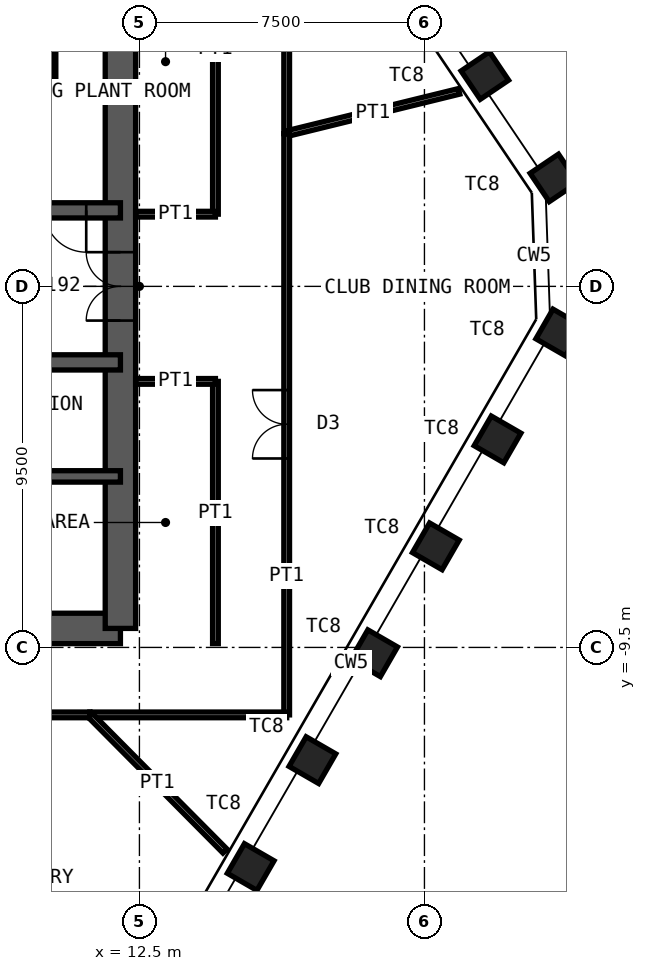
"""IFC4 building model, lengths in metres.
Left out: names, types, materials, properties, quantities, classifications, styles, units other than length and angle.
Written with IfcOpenShell. Run it as: python <this file> out.ifc"""

import sys

from ifc_helpers import new_model, si_unit, direction, frame, frame_2d, origin, origin_2d, place, context, subcontext, project, spatial, rectangle, hollow_rectangle, extrude, element, fill, save


model = new_model("IFC4")
c1 = context("Model", 3, precision=1e-05, world=origin(), true_north=direction((0.0, 1.0)))
c2 = subcontext(c1, "Body", "Model", "MODEL_VIEW")
j1 = project(units=[si_unit("LENGTHUNIT", "METRE"), si_unit("PLANEANGLEUNIT", "RADIAN")], contexts=[c1])
p1 = place(None, origin())
s1 = spatial("IfcSite", under=j1, at=p1, CompositionType="ELEMENT")
p2 = place(p1, origin())
s2 = spatial("IfcBuilding", under=s1, at=p2, CompositionType="ELEMENT")
p3 = place(p2, frame((0.0, 0.0, 320.8)))
s3 = spatial("IfcBuildingStorey", under=s2, at=p3, CompositionType="ELEMENT", Elevation=320.8)
for number, where, z_axis, x_axis in (
    (1, (21.589, 5.547, 0.0), (0.0, 0.0, 1.0), (-0.559, 0.829, 0.0)),
    (2, (23.406, 2.854, 0.0), (0.0, 0.0, 1.0), (-0.559, 0.829, 0.0)),
    (3, (23.548, -1.214, 0.0), (0.0, 0.0, 1.0), (0.5, 0.866, 0.0)),
    (4, (21.924, -4.027, 0.0), (0.0, 0.0, 1.0), (0.5, 0.866, 0.0)),
    (5, (20.3, -6.84, 0.0), (0.0, 0.0, 1.0), (0.5, 0.866, 0.0)),
    (6, (18.676, -9.653, 0.0), (0.0, 0.0, 1.0), (0.5, 0.866, 0.0)),
    (7, (17.052, -12.466, 0.0), (0.0, 0.0, 1.0), (0.5, 0.866, 0.0)),
    (8, (15.427, -15.279, 0.0), (0.0, 0.0, 1.0), (0.5, 0.866, 0.0)),
):
    element("IfcColumn", number, at=place(p3, frame(where, z_axis=z_axis, x_axis=x_axis)), inside=s3, PredefinedType="COLUMN", context=c2, shape_type="SweptSolid", body=[
        extrude(hollow_rectangle(XDim=0.9, YDim=0.9, WallThickness=0.05, at=origin_2d()), origin(), (0.0, 0.0, 1.0), 4.2),
    ])
p4 = place(p3, frame((-12.0, -9.0, 0.0), z_axis=(0.0, 0.0, 1.0), x_axis=(1.0, 0.0, 0.0)))
e9 = element("IfcWall", 9, at=p4, inside=s3, PredefinedType="SHEAR", context=c2, shape_type="SweptSolid", body=[
    extrude(rectangle(XDim=24.0, YDim=0.8, at=frame_2d((12.0, 0.0))), origin(), (0.0, 0.0, 1.0), 4.2),
])
p5 = place(p4, frame((1.35, 0.0, 0.0)))
e10 = element("IfcOpeningElement", 10, at=p5, cuts=e9, PredefinedType="OPENING", context=c2, shape_type="SweptSolid", body=[
    extrude(rectangle(XDim=1.0, YDim=2.1, at=frame_2d((0.5, 1.05))), frame((0.0, 0.41, 0.0), z_axis=(0.0, -1.0, 0.0), x_axis=(1.0, 0.0, 0.0)), (0.0, 0.0, 1.0), 0.82),
])
p6 = place(p4, frame((5.325, 0.0, 0.0)))
e11 = element("IfcOpeningElement", 11, at=p6, cuts=e9, PredefinedType="OPENING", context=c2, shape_type="SweptSolid", body=[
    extrude(rectangle(XDim=1.15, YDim=2.1, at=frame_2d((0.575, 1.05))), frame((0.0, 0.41, 0.0), z_axis=(0.0, -1.0, 0.0), x_axis=(1.0, 0.0, 0.0)), (0.0, 0.0, 1.0), 0.82),
])
p7 = place(p4, frame((12.6, 0.0, 0.0)))
e12 = element("IfcOpeningElement", 12, at=p7, cuts=e9, PredefinedType="OPENING", context=c2, shape_type="SweptSolid", body=[
    extrude(rectangle(XDim=1.0, YDim=2.1, at=frame_2d((0.5, 1.05))), frame((0.0, 0.41, 0.0), z_axis=(0.0, -1.0, 0.0), x_axis=(1.0, 0.0, 0.0)), (0.0, 0.0, 1.0), 0.82),
])
p8 = place(p3, frame((12.0, -9.0, 0.0), z_axis=(0.0, 0.0, 1.0), x_axis=(0.0, 1.0, 0.0)))
e13 = element("IfcWall", 13, at=p8, inside=s3, PredefinedType="SHEAR", context=c2, shape_type="SweptSolid", body=[
    extrude(rectangle(XDim=18.0, YDim=0.8, at=frame_2d((9.0, 0.0))), origin(), (0.0, 0.0, 1.0), 4.2),
])
p9 = place(p8, frame((8.1, 0.0, 0.0)))
e14 = element("IfcOpeningElement", 14, at=p9, cuts=e13, PredefinedType="OPENING", context=c2, shape_type="SweptSolid", body=[
    extrude(rectangle(XDim=1.8, YDim=2.1, at=frame_2d((0.9, 1.05))), frame((0.0, 0.41, 0.0), z_axis=(0.0, -1.0, 0.0), x_axis=(1.0, 0.0, 0.0)), (0.0, 0.0, 1.0), 0.82),
])
p10 = place(p3, frame((-12.0, 5.0, 0.0), z_axis=(0.0, 0.0, 1.0), x_axis=(1.0, 0.0, 0.0)))
e15 = element("IfcWall", 15, at=p10, inside=s3, PredefinedType="SHEAR", context=c2, shape_type="SweptSolid", body=[
    extrude(rectangle(XDim=24.0, YDim=0.3, at=frame_2d((12.0, 0.0))), origin(), (0.0, 0.0, 1.0), 4.2),
])
p11 = place(p3, frame((-12.0, 2.0, 0.0), z_axis=(0.0, 0.0, 1.0), x_axis=(1.0, 0.0, 0.0)))
e16 = element("IfcWall", 16, at=p11, inside=s3, PredefinedType="SHEAR", context=c2, shape_type="SweptSolid", body=[
    extrude(rectangle(XDim=24.0, YDim=0.4, at=frame_2d((12.0, 0.0))), origin(), (0.0, 0.0, 1.0), 4.2),
])
p12 = place(p11, frame((2.4, 0.0, 0.0)))
e17 = element("IfcOpeningElement", 17, at=p12, cuts=e16, PredefinedType="OPENING", context=c2, shape_type="SweptSolid", body=[
    extrude(rectangle(XDim=1.1, YDim=2.1, at=frame_2d((0.55, 1.05))), frame((0.0, 0.21, 0.0), z_axis=(0.0, -1.0, 0.0), x_axis=(1.0, 0.0, 0.0)), (0.0, 0.0, 1.0), 0.42),
])
p13 = place(p11, frame((22.0, 0.0, 0.0)))
e18 = element("IfcOpeningElement", 18, at=p13, cuts=e16, PredefinedType="OPENING", context=c2, shape_type="SweptSolid", body=[
    extrude(rectangle(XDim=1.1, YDim=2.1, at=frame_2d((0.55, 1.05))), frame((0.0, 0.21, 0.0), z_axis=(0.0, -1.0, 0.0), x_axis=(1.0, 0.0, 0.0)), (0.0, 0.0, 1.0), 0.42),
])
p14 = place(p11, frame((10.15, 0.0, 0.0)))
e19 = element("IfcOpeningElement", 19, at=p14, cuts=e16, PredefinedType="OPENING", context=c2, shape_type="SweptSolid", body=[
    extrude(rectangle(XDim=1.0, YDim=2.1, at=frame_2d((0.5, 1.05))), frame((0.0, 0.21, 0.0), z_axis=(0.0, -1.0, 0.0), x_axis=(1.0, 0.0, 0.0)), (0.0, 0.0, 1.0), 0.42),
])
p15 = place(p11, frame((6.9, 0.0, 0.0)))
e20 = element("IfcOpeningElement", 20, at=p15, cuts=e16, PredefinedType="OPENING", context=c2, shape_type="SweptSolid", body=[
    extrude(rectangle(XDim=1.0, YDim=2.1, at=frame_2d((0.5, 1.05))), frame((0.0, 0.21, 0.0), z_axis=(0.0, -1.0, 0.0), x_axis=(1.0, 0.0, 0.0)), (0.0, 0.0, 1.0), 0.42),
])
p16 = place(p11, frame((13.35, 0.0, 0.0)))
e21 = element("IfcOpeningElement", 21, at=p16, cuts=e16, PredefinedType="OPENING", context=c2, shape_type="SweptSolid", body=[
    extrude(rectangle(XDim=1.1, YDim=2.4, at=frame_2d((0.55, 1.2))), frame((0.0, 0.21, 0.0), z_axis=(0.0, -1.0, 0.0), x_axis=(1.0, 0.0, 0.0)), (0.0, 0.0, 1.0), 0.42),
])
p17 = place(p11, frame((16.15, 0.0, 0.0)))
e22 = element("IfcOpeningElement", 22, at=p17, cuts=e16, PredefinedType="OPENING", context=c2, shape_type="SweptSolid", body=[
    extrude(rectangle(XDim=1.1, YDim=2.4, at=frame_2d((0.55, 1.2))), frame((0.0, 0.21, 0.0), z_axis=(0.0, -1.0, 0.0), x_axis=(1.0, 0.0, 0.0)), (0.0, 0.0, 1.0), 0.42),
])
p18 = place(p11, frame((19.0, 0.0, 0.0)))
e23 = element("IfcOpeningElement", 23, at=p18, cuts=e16, PredefinedType="OPENING", context=c2, shape_type="SweptSolid", body=[
    extrude(rectangle(XDim=1.0, YDim=2.1, at=frame_2d((0.5, 1.05))), frame((0.0, 0.21, 0.0), z_axis=(0.0, -1.0, 0.0), x_axis=(1.0, 0.0, 0.0)), (0.0, 0.0, 1.0), 0.42),
])
p19 = place(p3, frame((-12.0, -2.0, 0.0), z_axis=(0.0, 0.0, 1.0), x_axis=(1.0, 0.0, 0.0)))
e24 = element("IfcWall", 24, at=p19, inside=s3, PredefinedType="SHEAR", context=c2, shape_type="SweptSolid", body=[
    extrude(rectangle(XDim=24.0, YDim=0.4, at=frame_2d((12.0, 0.0))), origin(), (0.0, 0.0, 1.0), 4.2),
])
p20 = place(p19, frame((1.1, 0.0, 0.0)))
e25 = element("IfcOpeningElement", 25, at=p20, cuts=e24, PredefinedType="OPENING", context=c2, shape_type="SweptSolid", body=[
    extrude(rectangle(XDim=1.1, YDim=2.1, at=frame_2d((0.55, 1.05))), frame((0.0, 0.21, 0.0), z_axis=(0.0, -1.0, 0.0), x_axis=(1.0, 0.0, 0.0)), (0.0, 0.0, 1.0), 0.42),
])
p21 = place(p19, frame((13.55, 0.0, 0.0)))
e26 = element("IfcOpeningElement", 26, at=p21, cuts=e24, PredefinedType="OPENING", context=c2, shape_type="SweptSolid", body=[
    extrude(rectangle(XDim=1.1, YDim=2.1, at=frame_2d((0.55, 1.05))), frame((0.0, 0.21, 0.0), z_axis=(0.0, -1.0, 0.0), x_axis=(1.0, 0.0, 0.0)), (0.0, 0.0, 1.0), 0.42),
])
p22 = place(p19, frame((20.7, 0.0, 0.0)))
e27 = element("IfcOpeningElement", 27, at=p22, cuts=e24, PredefinedType="OPENING", context=c2, shape_type="SweptSolid", body=[
    extrude(rectangle(XDim=1.1, YDim=2.1, at=frame_2d((0.55, 1.05))), frame((0.0, 0.21, 0.0), z_axis=(0.0, -1.0, 0.0), x_axis=(1.0, 0.0, 0.0)), (0.0, 0.0, 1.0), 0.42),
])
p23 = place(p19, frame((4.0, 0.0, 0.0)))
e28 = element("IfcOpeningElement", 28, at=p23, cuts=e24, PredefinedType="OPENING", context=c2, shape_type="SweptSolid", body=[
    extrude(rectangle(XDim=1.0, YDim=2.1, at=frame_2d((0.5, 1.05))), frame((0.0, 0.21, 0.0), z_axis=(0.0, -1.0, 0.0), x_axis=(1.0, 0.0, 0.0)), (0.0, 0.0, 1.0), 0.42),
])
p24 = place(p19, frame((6.8, 0.0, 0.0)))
e29 = element("IfcOpeningElement", 29, at=p24, cuts=e24, PredefinedType="OPENING", context=c2, shape_type="SweptSolid", body=[
    extrude(rectangle(XDim=1.0, YDim=2.1, at=frame_2d((0.5, 1.05))), frame((0.0, 0.21, 0.0), z_axis=(0.0, -1.0, 0.0), x_axis=(1.0, 0.0, 0.0)), (0.0, 0.0, 1.0), 0.42),
])
p25 = place(p19, frame((9.6, 0.0, 0.0)))
e30 = element("IfcOpeningElement", 30, at=p25, cuts=e24, PredefinedType="OPENING", context=c2, shape_type="SweptSolid", body=[
    extrude(rectangle(XDim=1.0, YDim=2.1, at=frame_2d((0.5, 1.05))), frame((0.0, 0.21, 0.0), z_axis=(0.0, -1.0, 0.0), x_axis=(1.0, 0.0, 0.0)), (0.0, 0.0, 1.0), 0.42),
])
p26 = place(p3, frame((-12.0, -5.0, 0.0), z_axis=(0.0, 0.0, 1.0), x_axis=(1.0, 0.0, 0.0)))
e31 = element("IfcWall", 31, at=p26, inside=s3, PredefinedType="SHEAR", context=c2, shape_type="SweptSolid", body=[
    extrude(rectangle(XDim=24.0, YDim=0.3, at=frame_2d((12.0, 0.0))), origin(), (0.0, 0.0, 1.0), 4.2),
])
p27 = place(p3, frame((10.25, 5.15, 0.0), z_axis=(0.0, 0.0, 1.0), x_axis=(0.0, 1.0, 0.0)))
e32 = element("IfcWall", 32, at=p27, inside=s3, PredefinedType="PARTITIONING", context=c2, shape_type="SweptSolid", body=[
    extrude(rectangle(XDim=1.5, YDim=0.1, at=frame_2d((0.75, 0.0))), origin(), (0.0, 0.0, 1.0), 2.1),
])
p28 = place(p3, frame((16.375, 11.275, 0.0), z_axis=(0.0, 0.0, 1.0), x_axis=(0.0, -1.0, 0.0)))
e33 = element("IfcWall", 33, at=p28, inside=s3, PredefinedType="PARTITIONING", context=c2, shape_type="SweptSolid", body=[
    extrude(rectangle(XDim=7.257, YDim=0.15, at=frame_2d((3.628, 0.0))), origin(), (0.0, 0.0, 1.0), 4.03),
])
p29 = place(p3, frame((20.912, 5.131, 0.0), z_axis=(0.0, 0.0, 1.0), x_axis=(-0.97118779717, -0.238315468713, 0.0)))
e34 = element("IfcWall", 34, at=p29, inside=s3, PredefinedType="PARTITIONING", context=c2, shape_type="SweptSolid", body=[
    extrude(rectangle(XDim=4.671, YDim=0.15, at=frame_2d((2.336, 0.0))), origin(), (0.0, 0.0, 1.0), 4.03),
])
p30 = place(p3, frame((16.375, 4.018, 0.0), z_axis=(0.0, 0.0, 1.0), x_axis=(0.0, -1.0, 0.0)))
e35 = element("IfcWall", 35, at=p30, inside=s3, PredefinedType="PARTITIONING", context=c2, shape_type="SweptSolid", body=[
    extrude(rectangle(XDim=15.293, YDim=0.15, at=frame_2d((7.646, 0.0))), origin(), (0.0, 0.0, 1.0), 4.03),
])
p31 = place(p30, frame((6.747, 0.0, 0.0)))
e36 = element("IfcOpeningElement", 36, at=p31, cuts=e35, PredefinedType="OPENING", context=c2, shape_type="SweptSolid", body=[
    extrude(rectangle(XDim=1.8, YDim=2.4, at=frame_2d((0.9, 1.2))), frame((0.0, 0.085, 0.0), z_axis=(0.0, -1.0, 0.0), x_axis=(1.0, 0.0, 0.0)), (0.0, 0.0, 1.0), 0.17),
])
p32 = place(p3, frame((16.375, -11.275, 0.0), z_axis=(0.0, 0.0, 1.0), x_axis=(-1.0, 0.0, 0.0)))
e37 = element("IfcWall", 37, at=p32, inside=s3, PredefinedType="PARTITIONING", context=c2, shape_type="SweptSolid", body=[
    extrude(rectangle(XDim=5.181, YDim=0.15, at=frame_2d((2.59, 0.0))), origin(), (0.0, 0.0, 1.0), 4.03),
])
p33 = place(p3, frame((14.751, -14.858, 0.0), z_axis=(0.0, 0.0, 1.0), x_axis=(-0.704539120613, 0.709665151692, 0.0)))
e38 = element("IfcWall", 38, at=p33, inside=s3, PredefinedType="PARTITIONING", context=c2, shape_type="SweptSolid", body=[
    extrude(rectangle(XDim=5.049, YDim=0.15, at=frame_2d((2.524, 0.0))), origin(), (0.0, 0.0, 1.0), 3.33),
])
p34 = place(p3, frame((11.194, -11.275, 0.0), z_axis=(0.0, 0.0, 1.0), x_axis=(-1.0, 0.0, 0.0)))
e39 = element("IfcWall", 39, at=p34, inside=s3, PredefinedType="PARTITIONING", context=c2, shape_type="SweptSolid", body=[
    extrude(rectangle(XDim=7.266, YDim=0.15, at=frame_2d((3.633, 0.0))), origin(), (0.0, 0.0, 1.0), 4.03),
])
p35 = place(p34, frame((3.133, 0.0, 0.0)))
e40 = element("IfcOpeningElement", 40, at=p35, cuts=e39, PredefinedType="OPENING", context=c2, shape_type="SweptSolid", body=[
    extrude(rectangle(XDim=1.0, YDim=2.4, at=frame_2d((0.5, 1.2))), frame((0.0, 0.085, 0.0), z_axis=(0.0, -1.0, 0.0), x_axis=(1.0, 0.0, 0.0)), (0.0, 0.0, 1.0), 0.17),
])
p36 = place(p3, frame((14.5, 1.9, 0.0), z_axis=(0.0, 0.0, 1.0), x_axis=(0.0, 1.0, 0.0)))
e41 = element("IfcWall", 41, at=p36, inside=s3, PredefinedType="PARTITIONING", context=c2, shape_type="SweptSolid", body=[
    extrude(rectangle(XDim=7.5, YDim=0.15, at=frame_2d((3.75, 0.0))), origin(), (0.0, 0.0, 1.0), 4.03),
])
p37 = place(p3, frame((12.4, 1.9, 0.0), z_axis=(0.0, 0.0, 1.0), x_axis=(1.0, 0.0, 0.0)))
e42 = element("IfcWall", 42, at=p37, inside=s3, PredefinedType="PARTITIONING", context=c2, shape_type="SweptSolid", body=[
    extrude(rectangle(XDim=2.1, YDim=0.15, at=frame_2d((1.05, 0.0))), origin(), (0.0, 0.0, 1.0), 2.93),
])
p38 = place(p3, frame((14.5, -9.4, 0.0), z_axis=(0.0, 0.0, 1.0), x_axis=(0.0, 1.0, 0.0)))
e43 = element("IfcWall", 43, at=p38, inside=s3, PredefinedType="PARTITIONING", context=c2, shape_type="SweptSolid", body=[
    extrude(rectangle(XDim=6.9, YDim=0.15, at=frame_2d((3.45, 0.0))), origin(), (0.0, 0.0, 1.0), 4.03),
])
p39 = place(p3, frame((12.4, -2.5, 0.0), z_axis=(0.0, 0.0, 1.0), x_axis=(1.0, 0.0, 0.0)))
e44 = element("IfcWall", 44, at=p39, inside=s3, PredefinedType="PARTITIONING", context=c2, shape_type="SweptSolid", body=[
    extrude(rectangle(XDim=2.1, YDim=0.15, at=frame_2d((1.05, 0.0))), origin(), (0.0, 0.0, 1.0), 3.33),
])
p40 = place(p13, origin())
e45 = element("IfcDoor", 45, at=p40, inside=s3, OperationType="SINGLE_SWING_RIGHT", PredefinedType="DOOR", context=c2, shape_type="SweptSolid", body=[
    extrude(rectangle(XDim=1.1, YDim=2.1, at=frame_2d((0.55, 1.05))), frame((0.0, 0.025, 0.0), z_axis=(0.0, -1.0, 0.0), x_axis=(1.0, 0.0, 0.0)), (0.0, 0.0, 1.0), 0.05),
])
fill(e18, e45)
p41 = place(p9, origin())
e46 = element("IfcDoor", 46, at=p41, inside=s3, OperationType="DOUBLE_DOOR_DOUBLE_SWING", PredefinedType="DOOR", context=c2, shape_type="SweptSolid", body=[
    extrude(rectangle(XDim=1.8, YDim=2.1, at=frame_2d((0.9, 1.05))), frame((0.0, 0.025, 0.0), z_axis=(0.0, -1.0, 0.0), x_axis=(1.0, 0.0, 0.0)), (0.0, 0.0, 1.0), 0.05),
])
fill(e14, e46)
p42 = place(p31, origin())
e47 = element("IfcDoor", 47, at=p42, inside=s3, OperationType="DOUBLE_DOOR_DOUBLE_SWING", PredefinedType="DOOR", context=c2, shape_type="SweptSolid", body=[
    extrude(rectangle(XDim=1.8, YDim=2.4, at=frame_2d((0.9, 1.2))), frame((0.0, 0.025, 0.0), z_axis=(0.0, -1.0, 0.0), x_axis=(1.0, 0.0, 0.0)), (0.0, 0.0, 1.0), 0.05),
])
fill(e36, e47)
save(model, sys.argv[1])
